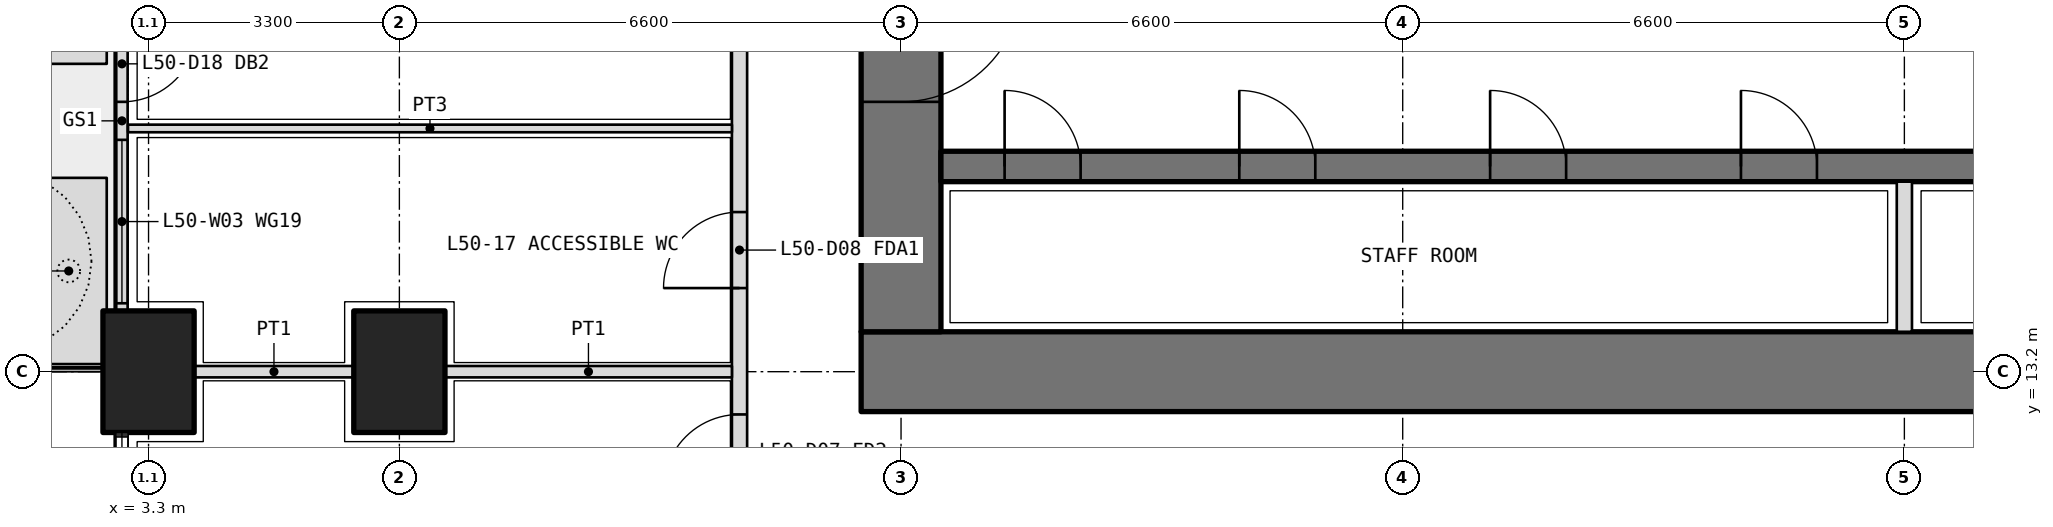
"""IFC4 building model, lengths in metres.
Left out: names, types, materials, properties, quantities, classifications, styles, units other than length and angle.
Written with IfcOpenShell. Run it as: python <this file> out.ifc"""

import sys

from ifc_helpers import new_model, si_unit, direction, frame, frame_2d, origin, origin_2d, place, context, subcontext, project, spatial, polyline, rectangle, outline, extrude, element, fill, save


model = new_model("IFC4")
c1 = context("Model", 3, precision=1e-05, world=origin(), true_north=direction((0.0, 1.0)))
c2 = subcontext(c1, "Body", "Model", "MODEL_VIEW")
j1 = project(units=[si_unit("LENGTHUNIT", "METRE"), si_unit("PLANEANGLEUNIT", "RADIAN")], contexts=[c1])
p1 = place(None, origin())
s1 = spatial("IfcSite", under=j1, at=p1, CompositionType="ELEMENT")
p2 = place(p1, origin())
s2 = spatial("IfcBuilding", under=s1, at=p2, CompositionType="ELEMENT")
p3 = place(p2, frame((0.0, 0.0, 218.7)))
s3 = spatial("IfcBuildingStorey", under=s2, at=p3, CompositionType="ELEMENT", Elevation=218.7)
for number, where, z_axis, x_axis in (
    (1, (3.3, 13.2, 0.0), (0.0, 0.0, 1.0), (0.0, 1.0, 0.0)),
    (2, (6.6, 13.2, 0.0), (0.0, 0.0, 1.0), (0.0, 1.0, 0.0)),
):
    element("IfcColumn", number, at=place(p3, frame(where, z_axis=z_axis, x_axis=x_axis)), inside=s3, PredefinedType="COLUMN", context=c2, shape_type="SweptSolid", body=[
        extrude(rectangle(XDim=1.6, YDim=1.2, at=origin_2d()), origin(), (0.0, 0.0, 1.0), 4.2),
    ])
p4 = place(p3, origin())
e3 = element("IfcWall", 3, at=p4, inside=s3, PredefinedType="USERDEFINED", context=c2, shape_type="SweptSolid", body=[
    extrude(outline(polyline([(1.75, 13.3), (2.75, 13.3), (2.75, 15.75), (1.75, 15.75), (1.75, 13.3)]), holes=[polyline([(1.9, 13.45), (2.6, 13.45), (2.6, 15.6), (1.9, 15.6), (1.9, 13.45)])]), origin(), (0.0, 0.0, 1.0), 1.05),
])
p5 = place(p3, origin())
e4 = element("IfcWall", 4, at=p5, inside=s3, PredefinedType="USERDEFINED", context=c2, shape_type="SweptSolid", body=[
    extrude(outline(polyline([(1.75, 17.25), (2.75, 17.25), (2.75, 26.3), (1.75, 26.3), (1.75, 17.25)]), holes=[polyline([(1.9, 17.4), (2.6, 17.4), (2.6, 26.15), (1.9, 26.15), (1.9, 17.4)])]), origin(), (0.0, 0.0, 1.0), 1.05),
])
p6 = place(p3, frame((2.95, 19.0, 0.0), z_axis=(0.0, 0.0, 1.0), x_axis=(0.0, -1.0, 0.0)))
e5 = element("IfcWall", 5, at=p6, inside=s3, PredefinedType="SOLIDWALL", context=c2, shape_type="SweptSolid", body=[
    extrude(rectangle(XDim=5.0, YDim=0.15, at=frame_2d((2.5, 0.0))), origin(), (0.0, 0.0, 1.0), 2.05),
])
p7 = place(p6, frame((1.25, 0.0, 0.0)))
e6 = element("IfcOpeningElement", 6, at=p7, cuts=e5, PredefinedType="OPENING", context=c2, shape_type="SweptSolid", body=[
    extrude(rectangle(XDim=1.0, YDim=2.0, at=frame_2d((0.5, 1.0))), frame((0.0, 0.085, 0.0), z_axis=(0.0, -1.0, 0.0), x_axis=(1.0, 0.0, 0.0)), (0.0, 0.0, 1.0), 0.17),
])
p8 = place(p6, frame((0.1, 0.0, 0.1)))
e7 = element("IfcOpeningElement", 7, at=p8, cuts=e5, PredefinedType="OPENING", context=c2, shape_type="SweptSolid", body=[
    extrude(rectangle(XDim=1.05, YDim=1.65, at=frame_2d((0.525, 0.825))), frame((0.0, 0.085, 0.0), z_axis=(0.0, -1.0, 0.0), x_axis=(1.0, 0.0, 0.0)), (0.0, 0.0, 1.0), 0.17),
])
p9 = place(p6, frame((2.75, 0.0, 0.1)))
e8 = element("IfcOpeningElement", 8, at=p9, cuts=e5, PredefinedType="OPENING", context=c2, shape_type="SweptSolid", body=[
    extrude(rectangle(XDim=2.15, YDim=1.65, at=frame_2d((1.075, 0.825))), frame((0.0, 0.085, 0.0), z_axis=(0.0, -1.0, 0.0), x_axis=(1.0, 0.0, 0.0)), (0.0, 0.0, 1.0), 0.17),
])
p10 = place(p3, frame((12.675, 13.2, 0.0), z_axis=(0.0, 0.0, 1.0), x_axis=(1.0, 0.0, 0.0)))
e9 = element("IfcWall", 9, at=p10, inside=s3, PredefinedType="SHEAR", context=c2, shape_type="SweptSolid", body=[
    extrude(rectangle(XDim=27.45, YDim=1.05, at=frame_2d((13.725, 0.0))), origin(), (0.0, 0.0, 1.0), 4.2),
])
p11 = place(p3, frame((13.2, 32.475, 0.0), z_axis=(0.0, 0.0, 1.0), x_axis=(0.0, -1.0, 0.0)))
e10 = element("IfcWall", 10, at=p11, inside=s3, PredefinedType="SHEAR", context=c2, shape_type="SweptSolid", body=[
    extrude(rectangle(XDim=18.75, YDim=1.05, at=frame_2d((9.375, 0.0))), origin(), (0.0, 0.0, 1.0), 4.2),
])
p12 = place(p11, frame((14.125, 0.0, 0.0)))
e11 = element("IfcOpeningElement", 11, at=p12, cuts=e10, PredefinedType="OPENING", context=c2, shape_type="SweptSolid", body=[
    extrude(rectangle(XDim=1.6, YDim=2.1, at=frame_2d((0.8, 1.05))), frame((0.0, 0.535, 0.0), z_axis=(0.0, -1.0, 0.0), x_axis=(1.0, 0.0, 0.0)), (0.0, 0.0, 1.0), 1.07),
])
p13 = place(p11, frame((3.325, 0.0, 0.0)))
e12 = element("IfcOpeningElement", 12, at=p13, cuts=e10, PredefinedType="OPENING", context=c2, shape_type="SweptSolid", body=[
    extrude(rectangle(XDim=1.6, YDim=2.1, at=frame_2d((0.8, 1.05))), frame((0.0, 0.535, 0.0), z_axis=(0.0, -1.0, 0.0), x_axis=(1.0, 0.0, 0.0)), (0.0, 0.0, 1.0), 1.07),
])
p14 = place(p3, frame((13.725, 15.9, 0.0), z_axis=(0.0, 0.0, 1.0), x_axis=(1.0, 0.0, 0.0)))
e13 = element("IfcWall", 13, at=p14, inside=s3, PredefinedType="SHEAR", context=c2, shape_type="SweptSolid", body=[
    extrude(rectangle(XDim=25.35, YDim=0.4, at=frame_2d((12.675, 0.0))), origin(), (0.0, 0.0, 1.0), 4.2),
])
p15 = place(p14, frame((0.837, 0.0, 0.0)))
e14 = element("IfcOpeningElement", 14, at=p15, cuts=e13, PredefinedType="OPENING", context=c2, shape_type="SweptSolid", body=[
    extrude(rectangle(XDim=1.0, YDim=2.1, at=frame_2d((0.5, 1.05))), frame((0.0, 0.21, 0.0), z_axis=(0.0, -1.0, 0.0), x_axis=(1.0, 0.0, 0.0)), (0.0, 0.0, 1.0), 0.42),
])
p16 = place(p14, frame((3.925, 0.0, 0.0)))
e15 = element("IfcOpeningElement", 15, at=p16, cuts=e13, PredefinedType="OPENING", context=c2, shape_type="SweptSolid", body=[
    extrude(rectangle(XDim=1.0, YDim=2.1, at=frame_2d((0.5, 1.05))), frame((0.0, 0.21, 0.0), z_axis=(0.0, -1.0, 0.0), x_axis=(1.0, 0.0, 0.0)), (0.0, 0.0, 1.0), 0.42),
])
p17 = place(p14, frame((7.225, 0.0, 0.0)))
e16 = element("IfcOpeningElement", 16, at=p17, cuts=e13, PredefinedType="OPENING", context=c2, shape_type="SweptSolid", body=[
    extrude(rectangle(XDim=1.0, YDim=2.1, at=frame_2d((0.5, 1.05))), frame((0.0, 0.21, 0.0), z_axis=(0.0, -1.0, 0.0), x_axis=(1.0, 0.0, 0.0)), (0.0, 0.0, 1.0), 0.42),
])
p18 = place(p14, frame((10.525, 0.0, 0.0)))
e17 = element("IfcOpeningElement", 17, at=p18, cuts=e13, PredefinedType="OPENING", context=c2, shape_type="SweptSolid", body=[
    extrude(rectangle(XDim=1.0, YDim=2.1, at=frame_2d((0.5, 1.05))), frame((0.0, 0.21, 0.0), z_axis=(0.0, -1.0, 0.0), x_axis=(1.0, 0.0, 0.0)), (0.0, 0.0, 1.0), 0.42),
])
p19 = place(p14, frame((13.825, 0.0, 0.0)))
e18 = element("IfcOpeningElement", 18, at=p19, cuts=e13, PredefinedType="OPENING", context=c2, shape_type="SweptSolid", body=[
    extrude(rectangle(XDim=1.0, YDim=2.1, at=frame_2d((0.5, 1.05))), frame((0.0, 0.21, 0.0), z_axis=(0.0, -1.0, 0.0), x_axis=(1.0, 0.0, 0.0)), (0.0, 0.0, 1.0), 0.42),
])
p20 = place(p14, frame((17.125, 0.0, 0.0)))
e19 = element("IfcOpeningElement", 19, at=p20, cuts=e13, PredefinedType="OPENING", context=c2, shape_type="SweptSolid", body=[
    extrude(rectangle(XDim=1.0, YDim=2.1, at=frame_2d((0.5, 1.05))), frame((0.0, 0.21, 0.0), z_axis=(0.0, -1.0, 0.0), x_axis=(1.0, 0.0, 0.0)), (0.0, 0.0, 1.0), 0.42),
])
p21 = place(p14, frame((20.425, 0.0, 0.0)))
e20 = element("IfcOpeningElement", 20, at=p21, cuts=e13, PredefinedType="OPENING", context=c2, shape_type="SweptSolid", body=[
    extrude(rectangle(XDim=1.0, YDim=2.1, at=frame_2d((0.5, 1.05))), frame((0.0, 0.21, 0.0), z_axis=(0.0, -1.0, 0.0), x_axis=(1.0, 0.0, 0.0)), (0.0, 0.0, 1.0), 0.42),
])
p22 = place(p14, frame((23.512, 0.0, 0.0)))
e21 = element("IfcOpeningElement", 21, at=p22, cuts=e13, PredefinedType="OPENING", context=c2, shape_type="SweptSolid", body=[
    extrude(rectangle(XDim=1.0, YDim=2.1, at=frame_2d((0.5, 1.05))), frame((0.0, 0.21, 0.0), z_axis=(0.0, -1.0, 0.0), x_axis=(1.0, 0.0, 0.0)), (0.0, 0.0, 1.0), 0.42),
])
p23 = place(p3, frame((26.4, 13.725, 0.0), z_axis=(0.0, 0.0, 1.0), x_axis=(0.0, 1.0, 0.0)))
e22 = element("IfcWall", 22, at=p23, inside=s3, PredefinedType="PARTITIONING", context=c2, shape_type="SweptSolid", body=[
    extrude(rectangle(XDim=1.975, YDim=0.2, at=frame_2d((0.987, 0.0))), origin(), (0.0, 0.0, 1.0), 4.2),
])
p24 = place(p3, frame((11.075, 11.175, 0.0), z_axis=(0.0, 0.0, 1.0), x_axis=(0.0, 1.0, 0.0)))
e23 = element("IfcWall", 23, at=p24, inside=s3, PredefinedType="PARTITIONING", context=c2, shape_type="SweptSolid", body=[
    extrude(rectangle(XDim=23.85, YDim=0.2, at=frame_2d((11.925, 0.0))), origin(), (0.0, 0.0, 1.0), 2.55),
])
p25 = place(p24, frame((0.462, 0.0, 0.0)))
e24 = element("IfcOpeningElement", 24, at=p25, cuts=e23, PredefinedType="OPENING", context=c2, shape_type="SweptSolid", body=[
    extrude(rectangle(XDim=1.0, YDim=2.1, at=frame_2d((0.5, 1.05))), frame((0.0, 0.11, 0.0), z_axis=(0.0, -1.0, 0.0), x_axis=(1.0, 0.0, 0.0)), (0.0, 0.0, 1.0), 0.22),
])
p26 = place(p24, frame((3.125, 0.0, 0.0)))
e25 = element("IfcOpeningElement", 25, at=p26, cuts=e23, PredefinedType="OPENING", context=c2, shape_type="SweptSolid", body=[
    extrude(rectangle(XDim=1.0, YDim=2.1, at=frame_2d((0.5, 1.05))), frame((0.0, 0.11, 0.0), z_axis=(0.0, -1.0, 0.0), x_axis=(1.0, 0.0, 0.0)), (0.0, 0.0, 1.0), 0.22),
])
p27 = place(p24, frame((6.475, 0.0, 0.0)))
e26 = element("IfcOpeningElement", 26, at=p27, cuts=e23, PredefinedType="OPENING", context=c2, shape_type="SweptSolid", body=[
    extrude(rectangle(XDim=0.9, YDim=2.1, at=frame_2d((0.45, 1.05))), frame((0.0, 0.11, 0.0), z_axis=(0.0, -1.0, 0.0), x_axis=(1.0, 0.0, 0.0)), (0.0, 0.0, 1.0), 0.22),
])
p28 = place(p24, frame((9.675, 0.0, 0.0)))
e27 = element("IfcOpeningElement", 27, at=p28, cuts=e23, PredefinedType="OPENING", context=c2, shape_type="SweptSolid", body=[
    extrude(rectangle(XDim=0.9, YDim=2.1, at=frame_2d((0.45, 1.05))), frame((0.0, 0.11, 0.0), z_axis=(0.0, -1.0, 0.0), x_axis=(1.0, 0.0, 0.0)), (0.0, 0.0, 1.0), 0.22),
])
p29 = place(p24, frame((12.925, 0.0, 0.0)))
e28 = element("IfcOpeningElement", 28, at=p29, cuts=e23, PredefinedType="OPENING", context=c2, shape_type="SweptSolid", body=[
    extrude(rectangle(XDim=1.0, YDim=2.1, at=frame_2d((0.5, 1.05))), frame((0.0, 0.11, 0.0), z_axis=(0.0, -1.0, 0.0), x_axis=(1.0, 0.0, 0.0)), (0.0, 0.0, 1.0), 0.22),
])
p30 = place(p24, frame((19.087, 0.0, 0.0)))
e29 = element("IfcOpeningElement", 29, at=p30, cuts=e23, PredefinedType="OPENING", context=c2, shape_type="SweptSolid", body=[
    extrude(rectangle(XDim=1.0, YDim=2.1, at=frame_2d((0.5, 1.05))), frame((0.0, 0.11, 0.0), z_axis=(0.0, -1.0, 0.0), x_axis=(1.0, 0.0, 0.0)), (0.0, 0.0, 1.0), 0.22),
])
p31 = place(p3, frame((3.03, 16.4, 0.0), z_axis=(0.0, 0.0, 1.0), x_axis=(1.0, 0.0, 0.0)))
e30 = element("IfcWall", 30, at=p31, inside=s3, PredefinedType="PARTITIONING", context=c2, shape_type="SweptSolid", body=[
    extrude(rectangle(XDim=7.945, YDim=0.1, at=frame_2d((3.973, 0.0))), origin(), (0.0, 0.0, 1.0), 3.85),
])
p32 = place(p3, frame((3.9, 13.2, 0.0), z_axis=(0.0, 0.0, 1.0), x_axis=(1.0, 0.0, 0.0)))
e31 = element("IfcWall", 31, at=p32, inside=s3, PredefinedType="PARTITIONING", context=c2, shape_type="SweptSolid", body=[
    extrude(rectangle(XDim=2.1, YDim=0.15, at=frame_2d((1.05, 0.0))), origin(), (0.0, 0.0, 1.0), 2.55),
])
p33 = place(p3, frame((7.2, 13.2, 0.0), z_axis=(0.0, 0.0, 1.0), x_axis=(1.0, 0.0, 0.0)))
e32 = element("IfcWall", 32, at=p33, inside=s3, PredefinedType="PARTITIONING", context=c2, shape_type="SweptSolid", body=[
    extrude(rectangle(XDim=3.775, YDim=0.15, at=frame_2d((1.888, 0.0))), origin(), (0.0, 0.0, 1.0), 2.55),
])
p34 = place(p7, origin())
e33 = element("IfcDoor", 33, at=p34, inside=s3, OperationType="SINGLE_SWING_LEFT", PredefinedType="DOOR", context=c2, shape_type="SweptSolid", body=[
    extrude(rectangle(XDim=1.0, YDim=2.0, at=frame_2d((0.5, 1.0))), frame((0.0, 0.025, 0.0), z_axis=(0.0, -1.0, 0.0), x_axis=(1.0, 0.0, 0.0)), (0.0, 0.0, 1.0), 0.05),
])
fill(e6, e33)
p35 = place(p9, origin())
e34 = element("IfcWindow", 34, at=p35, inside=s3, PartitioningType="SINGLE_PANEL", PredefinedType="WINDOW", context=c2, shape_type="SweptSolid", body=[
    extrude(rectangle(XDim=2.15, YDim=1.65, at=frame_2d((1.075, 0.825))), frame((0.0, 0.03, 0.0), z_axis=(0.0, -1.0, 0.0), x_axis=(1.0, 0.0, 0.0)), (0.0, 0.0, 1.0), 0.06),
])
fill(e8, e34)
p36 = place(p25, origin())
e35 = element("IfcDoor", 35, at=p36, inside=s3, OperationType="SINGLE_SWING_LEFT", PredefinedType="DOOR", context=c2, shape_type="SweptSolid", body=[
    extrude(rectangle(XDim=1.0, YDim=2.1, at=frame_2d((0.5, 1.05))), frame((0.0, 0.025, 0.0), z_axis=(0.0, -1.0, 0.0), x_axis=(1.0, 0.0, 0.0)), (0.0, 0.0, 1.0), 0.05),
])
fill(e24, e35)
p37 = place(p26, origin())
e36 = element("IfcDoor", 36, at=p37, inside=s3, OperationType="SINGLE_SWING_LEFT", PredefinedType="DOOR", context=c2, shape_type="SweptSolid", body=[
    extrude(rectangle(XDim=1.0, YDim=2.1, at=frame_2d((0.5, 1.05))), frame((0.0, 0.025, 0.0), z_axis=(0.0, -1.0, 0.0), x_axis=(1.0, 0.0, 0.0)), (0.0, 0.0, 1.0), 0.05),
])
fill(e25, e36)
p38 = place(p15, origin())
e37 = element("IfcDoor", 37, at=p38, inside=s3, OperationType="SINGLE_SWING_LEFT", PredefinedType="DOOR", context=c2, shape_type="SweptSolid", body=[
    extrude(rectangle(XDim=1.0, YDim=2.1, at=frame_2d((0.5, 1.05))), frame((0.0, 0.025, 0.0), z_axis=(0.0, -1.0, 0.0), x_axis=(1.0, 0.0, 0.0)), (0.0, 0.0, 1.0), 0.05),
])
fill(e14, e37)
p39 = place(p16, origin())
e38 = element("IfcDoor", 38, at=p39, inside=s3, OperationType="SINGLE_SWING_LEFT", PredefinedType="DOOR", context=c2, shape_type="SweptSolid", body=[
    extrude(rectangle(XDim=1.0, YDim=2.1, at=frame_2d((0.5, 1.05))), frame((0.0, 0.025, 0.0), z_axis=(0.0, -1.0, 0.0), x_axis=(1.0, 0.0, 0.0)), (0.0, 0.0, 1.0), 0.05),
])
fill(e15, e38)
p40 = place(p17, origin())
e39 = element("IfcDoor", 39, at=p40, inside=s3, OperationType="SINGLE_SWING_LEFT", PredefinedType="DOOR", context=c2, shape_type="SweptSolid", body=[
    extrude(rectangle(XDim=1.0, YDim=2.1, at=frame_2d((0.5, 1.05))), frame((0.0, 0.025, 0.0), z_axis=(0.0, -1.0, 0.0), x_axis=(1.0, 0.0, 0.0)), (0.0, 0.0, 1.0), 0.05),
])
fill(e16, e39)
p41 = place(p18, origin())
e40 = element("IfcDoor", 40, at=p41, inside=s3, OperationType="SINGLE_SWING_LEFT", PredefinedType="DOOR", context=c2, shape_type="SweptSolid", body=[
    extrude(rectangle(XDim=1.0, YDim=2.1, at=frame_2d((0.5, 1.05))), frame((0.0, 0.025, 0.0), z_axis=(0.0, -1.0, 0.0), x_axis=(1.0, 0.0, 0.0)), (0.0, 0.0, 1.0), 0.05),
])
fill(e17, e40)
p42 = place(p12, origin())
e41 = element("IfcDoor", 41, at=p42, inside=s3, OperationType="DOUBLE_DOOR_DOUBLE_SWING", PredefinedType="DOOR", context=c2, shape_type="SweptSolid", body=[
    extrude(rectangle(XDim=1.6, YDim=2.1, at=frame_2d((0.8, 1.05))), frame((0.0, 0.025, 0.0), z_axis=(0.0, -1.0, 0.0), x_axis=(1.0, 0.0, 0.0)), (0.0, 0.0, 1.0), 0.05),
])
fill(e11, e41)
save(model, sys.argv[1])
